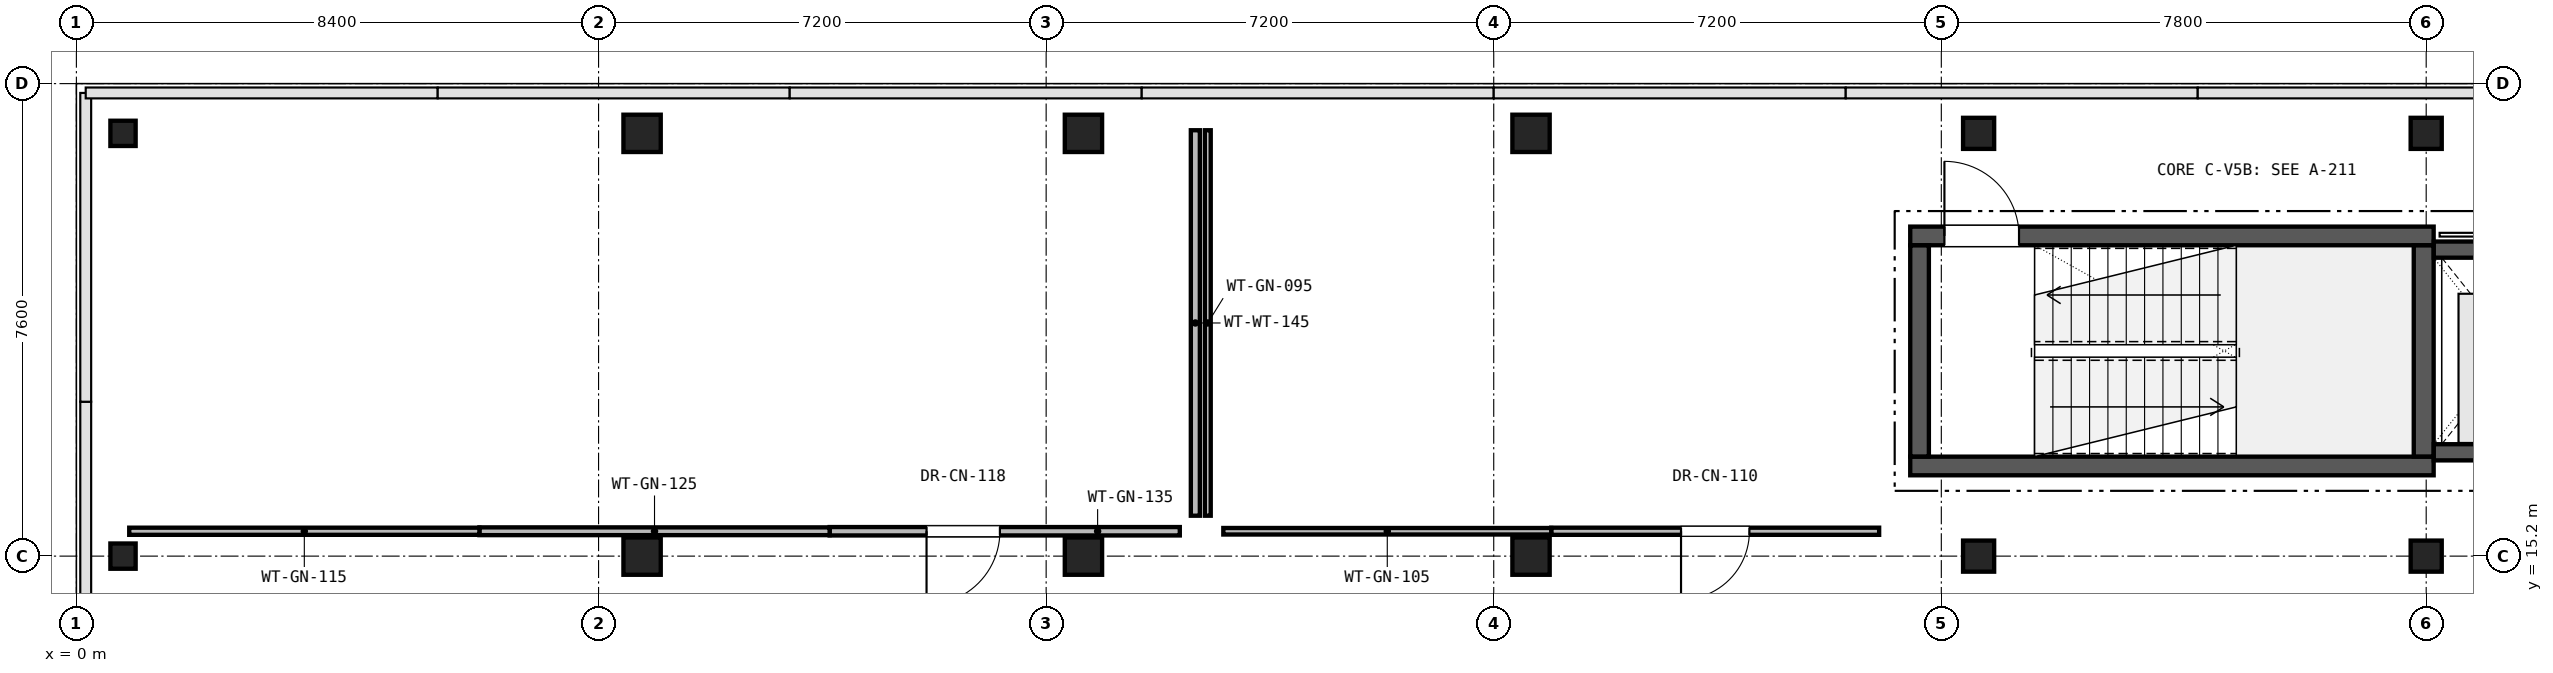
"""IFC4 building model, lengths in metres.
Left out: names, types, materials, properties, quantities, classifications, styles, units other than length and angle.
Written with IfcOpenShell. Run it as: python <this file> out.ifc"""

import sys

from ifc_helpers import new_model, si_unit, direction, frame, frame_2d, origin, origin_2d, place, context, subcontext, project, spatial, rectangle, hollow_circle, extrude, element, fill, save


model = new_model("IFC4")
c1 = context("Model", 3, precision=1e-05, world=origin(), true_north=direction((0.0, 1.0)))
c2 = subcontext(c1, "Body", "Model", "MODEL_VIEW")
j1 = project(units=[si_unit("LENGTHUNIT", "METRE"), si_unit("PLANEANGLEUNIT", "RADIAN")], contexts=[c1])
p1 = place(None, origin())
s1 = spatial("IfcSite", under=j1, at=p1, CompositionType="ELEMENT")
p2 = place(p1, origin())
s2 = spatial("IfcBuilding", under=s1, at=p2, CompositionType="ELEMENT")
p3 = place(p2, frame((0.0, 0.0, 17.68)))
s3 = spatial("IfcBuildingStorey", under=s2, at=p3, CompositionType="ELEMENT", Elevation=17.68)
for number, where, z_axis, x_axis in (
    (1, (0.75, 15.2, 0.0), (0.0, 0.0, 1.0), (1.0, 0.0, 0.0)),
    (2, (0.75, 22.0, 0.0), (0.0, 0.0, 1.0), (1.0, 0.0, 0.0)),
):
    element("IfcColumn", number, at=place(p3, frame(where, z_axis=z_axis, x_axis=x_axis)), inside=s3, PredefinedType="COLUMN", context=c2, shape_type="SweptSolid", body=[
        extrude(hollow_circle(Radius=0.203, WallThickness=0.016, at=origin_2d()), origin(), (0.0, 0.0, 1.0), 4.08),
    ])
for number, where, z_axis, x_axis in (
    (3, (9.1, 15.2, 0.0), (0.0, 0.0, 1.0), (1.0, 0.0, 0.0)),
    (4, (9.1, 22.0, 0.0), (0.0, 0.0, 1.0), (1.0, 0.0, 0.0)),
    (5, (16.2, 15.2, 0.0), (0.0, 0.0, 1.0), (1.0, 0.0, 0.0)),
    (6, (16.2, 22.0, 0.0), (0.0, 0.0, 1.0), (1.0, 0.0, 0.0)),
    (7, (23.4, 15.2, 0.0), (0.0, 0.0, 1.0), (1.0, 0.0, 0.0)),
    (8, (23.4, 22.0, 0.0), (0.0, 0.0, 1.0), (1.0, 0.0, 0.0)),
):
    element("IfcColumn", number, at=place(p3, frame(where, z_axis=z_axis, x_axis=x_axis)), inside=s3, PredefinedType="COLUMN", context=c2, shape_type="SweptSolid", body=[
        extrude(rectangle(XDim=0.6, YDim=0.6, at=origin_2d()), origin(), (0.0, 0.0, 1.0), 4.08),
    ])
for number, where, z_axis, x_axis in (
    (9, (30.6, 15.2, 0.0), (0.0, 0.0, 1.0), (1.0, 0.0, 0.0)),
    (10, (30.6, 22.0, 0.0), (0.0, 0.0, 1.0), (1.0, 0.0, 0.0)),
    (11, (37.8, 15.2, 0.0), (0.0, 0.0, 1.0), (1.0, 0.0, 0.0)),
    (12, (37.8, 22.0, 0.0), (0.0, 0.0, 1.0), (1.0, 0.0, 0.0)),
):
    element("IfcColumn", number, at=place(p3, frame(where, z_axis=z_axis, x_axis=x_axis)), inside=s3, PredefinedType="COLUMN", context=c2, shape_type="SweptSolid", body=[
        extrude(rectangle(XDim=0.5, YDim=0.5, at=origin_2d()), origin(), (0.0, 0.0, 1.0), 4.08),
    ])
p4 = place(p3, frame((29.5, 16.65, 0.0), z_axis=(0.0, 0.0, 1.0), x_axis=(1.0, 0.0, 0.0)))
e13 = element("IfcWall", 13, at=p4, inside=s3, PredefinedType="SHEAR", context=c2, shape_type="SweptSolid", body=[
    extrude(rectangle(XDim=8.42, YDim=0.3, at=frame_2d((4.21, 0.0))), origin(), (0.0, 0.0, 1.0), 3.72),
])
p5 = place(p3, frame((29.5, 20.35, 0.0), z_axis=(0.0, 0.0, 1.0), x_axis=(1.0, 0.0, 0.0)))
e14 = element("IfcWall", 14, at=p5, inside=s3, PredefinedType="SHEAR", context=c2, shape_type="SweptSolid", body=[
    extrude(rectangle(XDim=8.42, YDim=0.3, at=frame_2d((4.21, 0.0))), origin(), (0.0, 0.0, 1.0), 3.72),
])
p6 = place(p5, frame((0.55, 0.0, 0.0)))
e15 = element("IfcOpeningElement", 15, at=p6, cuts=e14, PredefinedType="OPENING", context=c2, shape_type="SweptSolid", body=[
    extrude(rectangle(XDim=1.2, YDim=2.2, at=frame_2d((0.6, 1.1))), frame((0.0, 0.16, 0.0), z_axis=(0.0, -1.0, 0.0), x_axis=(1.0, 0.0, 0.0)), (0.0, 0.0, 1.0), 0.32),
])
p7 = place(p3, frame((29.65, 16.802, 0.0), z_axis=(0.0, 0.0, 1.0), x_axis=(0.0, 1.0, 0.0)))
e16 = element("IfcWall", 16, at=p7, inside=s3, PredefinedType="SHEAR", context=c2, shape_type="SweptSolid", body=[
    extrude(rectangle(XDim=3.396, YDim=0.3, at=frame_2d((1.698, 0.0))), origin(), (0.0, 0.0, 1.0), 3.72),
])
p8 = place(p3, frame((37.76, 16.802, 0.0), z_axis=(0.0, 0.0, 1.0), x_axis=(0.0, 1.0, 0.0)))
e17 = element("IfcWall", 17, at=p8, inside=s3, PredefinedType="SHEAR", context=c2, shape_type="SweptSolid", body=[
    extrude(rectangle(XDim=3.396, YDim=0.32, at=frame_2d((1.698, 0.0))), origin(), (0.0, 0.0, 1.0), 3.72),
])
p9 = place(p3, frame((37.922, 16.87, 0.0), z_axis=(0.0, 0.0, 1.0), x_axis=(1.0, 0.0, 0.0)))
e18 = element("IfcWall", 18, at=p9, inside=s3, PredefinedType="SHEAR", context=c2, shape_type="SweptSolid", body=[
    extrude(rectangle(XDim=2.658, YDim=0.26, at=frame_2d((1.329, 0.0))), origin(), (0.0, 0.0, 1.0), 3.72),
])
p10 = place(p3, frame((37.922, 20.13, 0.0), z_axis=(0.0, 0.0, 1.0), x_axis=(1.0, 0.0, 0.0)))
e19 = element("IfcWall", 19, at=p10, inside=s3, PredefinedType="SHEAR", context=c2, shape_type="SweptSolid", body=[
    extrude(rectangle(XDim=2.658, YDim=0.26, at=frame_2d((1.329, 0.0))), origin(), (0.0, 0.0, 1.0), 3.72),
])
p11 = place(p10, frame((0.679, 0.0, 0.0)))
e20 = element("IfcOpeningElement", 20, at=p11, cuts=e19, PredefinedType="OPENING", context=c2, shape_type="SweptSolid", body=[
    extrude(rectangle(XDim=1.3, YDim=2.2, at=frame_2d((0.65, 1.1))), frame((0.0, 0.14, 0.0), z_axis=(0.0, -1.0, 0.0), x_axis=(1.0, 0.0, 0.0)), (0.0, 0.0, 1.0), 0.28),
])
p12 = place(p3, frame((18.0, 22.05, 0.0), z_axis=(0.0, 0.0, 1.0), x_axis=(0.0, -1.0, 0.0)))
e21 = element("IfcWall", 21, at=p12, inside=s3, PredefinedType="PARTITIONING", context=c2, shape_type="SweptSolid", body=[
    extrude(rectangle(XDim=6.2, YDim=0.145, at=frame_2d((3.1, 0.0))), origin(), (0.0, 0.0, 1.0), 2.77),
])
p13 = place(p3, frame((17.75, 15.6, 0.0), z_axis=(0.0, 0.0, 1.0), x_axis=(-1.0, 0.0, 0.0)))
e22 = element("IfcWall", 22, at=p13, inside=s3, PredefinedType="PARTITIONING", context=c2, shape_type="SweptSolid", body=[
    extrude(rectangle(XDim=5.633, YDim=0.135, at=frame_2d((2.816, 0.0))), origin(), (0.0, 0.0, 1.0), 2.77),
])
p14 = place(p13, frame((2.894, 0.0, 0.0)))
e23 = element("IfcOpeningElement", 23, at=p14, cuts=e22, PredefinedType="OPENING", context=c2, shape_type="SweptSolid", body=[
    extrude(rectangle(XDim=1.18, YDim=2.2, at=frame_2d((0.59, 1.1))), frame((0.0, 0.077, 0.0), z_axis=(0.0, -1.0, 0.0), x_axis=(1.0, 0.0, 0.0)), (0.0, 0.0, 1.0), 0.155),
])
p15 = place(p3, frame((12.117, 15.6, 0.0), z_axis=(0.0, 0.0, 1.0), x_axis=(-1.0, 0.0, 0.0)))
e24 = element("IfcWall", 24, at=p15, inside=s3, PredefinedType="PARTITIONING", context=c2, shape_type="SweptSolid", body=[
    extrude(rectangle(XDim=5.634, YDim=0.125, at=frame_2d((2.817, 0.0))), origin(), (0.0, 0.0, 1.0), 2.77),
])
p16 = place(p3, frame((6.483, 15.6, 0.0), z_axis=(0.0, 0.0, 1.0), x_axis=(-1.0, 0.0, 0.0)))
e25 = element("IfcWall", 25, at=p16, inside=s3, PredefinedType="PARTITIONING", context=c2, shape_type="SweptSolid", body=[
    extrude(rectangle(XDim=5.633, YDim=0.115, at=frame_2d((2.816, 0.0))), origin(), (0.0, 0.0, 1.0), 2.77),
])
p17 = place(p3, frame((29.0, 15.6, 0.0), z_axis=(0.0, 0.0, 1.0), x_axis=(-1.0, 0.0, 0.0)))
e26 = element("IfcWall", 26, at=p17, inside=s3, PredefinedType="PARTITIONING", context=c2, shape_type="SweptSolid", body=[
    extrude(rectangle(XDim=5.275, YDim=0.115, at=frame_2d((2.637, 0.0))), origin(), (0.0, 0.0, 1.0), 2.77),
])
p18 = place(p17, frame((2.087, 0.0, 0.0)))
e27 = element("IfcOpeningElement", 27, at=p18, cuts=e26, PredefinedType="OPENING", context=c2, shape_type="SweptSolid", body=[
    extrude(rectangle(XDim=1.1, YDim=2.2, at=frame_2d((0.55, 1.1))), frame((0.0, 0.067, 0.0), z_axis=(0.0, -1.0, 0.0), x_axis=(1.0, 0.0, 0.0)), (0.0, 0.0, 1.0), 0.135),
])
p19 = place(p3, frame((23.725, 15.6, 0.0), z_axis=(0.0, 0.0, 1.0), x_axis=(-1.0, 0.0, 0.0)))
e28 = element("IfcWall", 28, at=p19, inside=s3, PredefinedType="PARTITIONING", context=c2, shape_type="SweptSolid", body=[
    extrude(rectangle(XDim=5.275, YDim=0.105, at=frame_2d((2.638, 0.0))), origin(), (0.0, 0.0, 1.0), 2.77),
])
p20 = place(p3, frame((18.2, 15.85, 0.0), z_axis=(0.0, 0.0, 1.0), x_axis=(0.0, 1.0, 0.0)))
e29 = element("IfcWall", 29, at=p20, inside=s3, PredefinedType="PARTITIONING", context=c2, shape_type="SweptSolid", body=[
    extrude(rectangle(XDim=6.2, YDim=0.095, at=frame_2d((3.1, 0.0))), origin(), (0.0, 0.0, 1.0), 2.77),
])
p21 = place(p6, origin())
e30 = element("IfcDoor", 30, at=p21, inside=s3, OperationType="SINGLE_SWING_LEFT", PredefinedType="DOOR", context=c2, shape_type="SweptSolid", body=[
    extrude(rectangle(XDim=1.2, YDim=2.2, at=frame_2d((0.6, 1.1))), frame((0.0, 0.025, 0.0), z_axis=(0.0, -1.0, 0.0), x_axis=(1.0, 0.0, 0.0)), (0.0, 0.0, 1.0), 0.05),
])
fill(e15, e30)
p22 = place(p14, origin())
e31 = element("IfcDoor", 31, at=p22, inside=s3, OperationType="SINGLE_SWING_RIGHT", PredefinedType="DOOR", context=c2, shape_type="SweptSolid", body=[
    extrude(rectangle(XDim=1.18, YDim=2.2, at=frame_2d((0.59, 1.1))), frame((0.0, 0.025, 0.0), z_axis=(0.0, -1.0, 0.0), x_axis=(1.0, 0.0, 0.0)), (0.0, 0.0, 1.0), 0.05),
])
fill(e23, e31)
p23 = place(p18, origin())
e32 = element("IfcDoor", 32, at=p23, inside=s3, OperationType="SINGLE_SWING_RIGHT", PredefinedType="DOOR", context=c2, shape_type="SweptSolid", body=[
    extrude(rectangle(XDim=1.1, YDim=2.2, at=frame_2d((0.55, 1.1))), frame((0.0, 0.025, 0.0), z_axis=(0.0, -1.0, 0.0), x_axis=(1.0, 0.0, 0.0)), (0.0, 0.0, 1.0), 0.05),
])
fill(e27, e32)
save(model, sys.argv[1])
